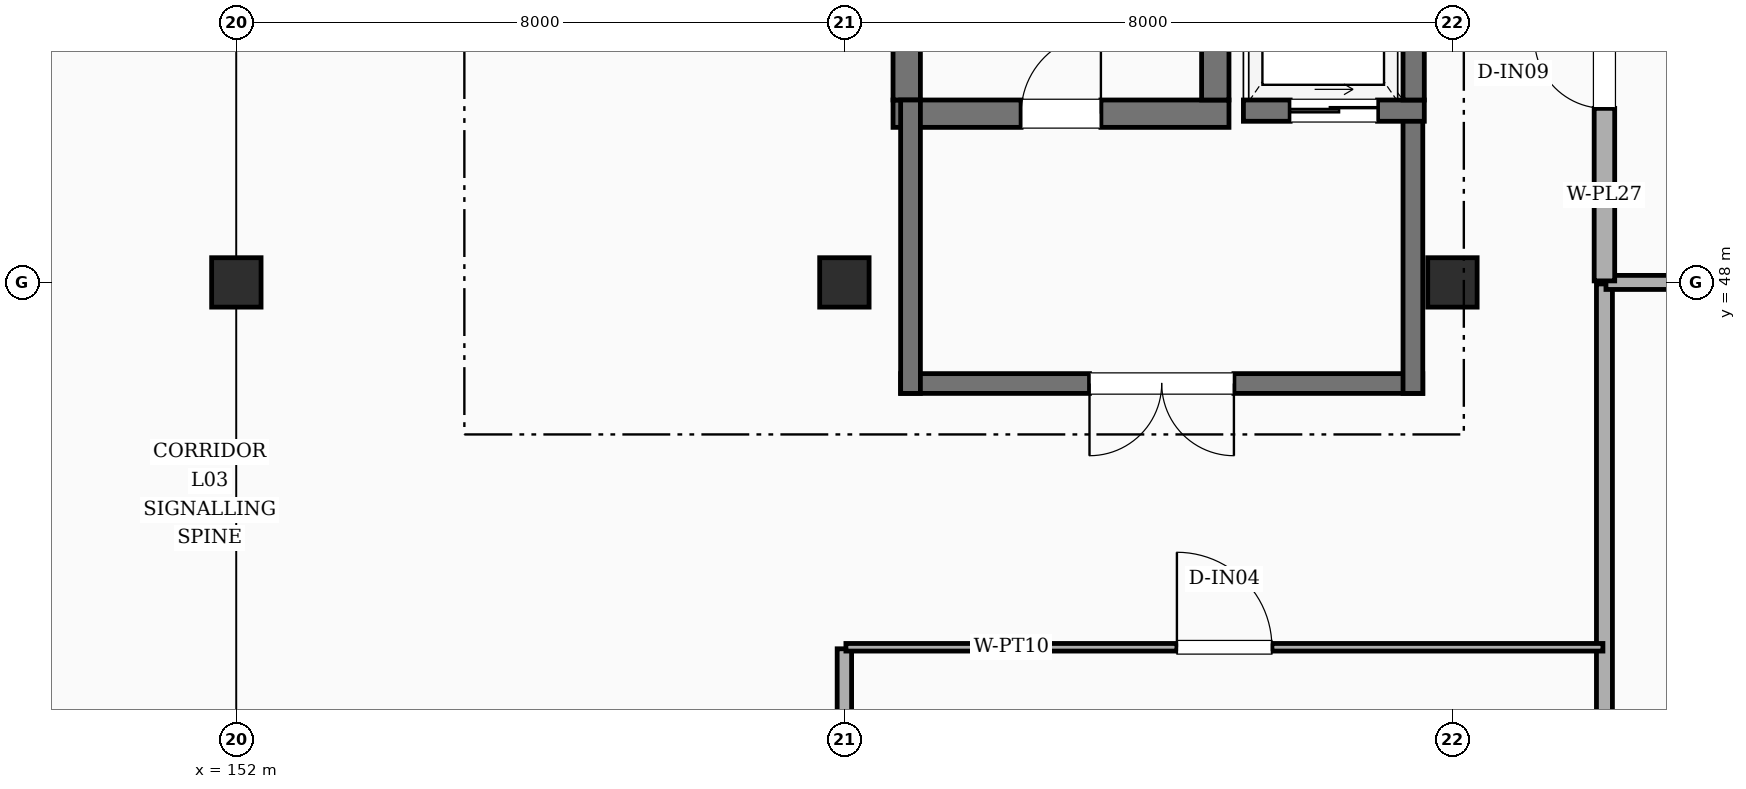
"""IFC4 building model, lengths in metres.
Left out: names, types, materials, properties, quantities, classifications, styles, units other than length and angle.
Written with IfcOpenShell. Run it as: python <this file> out.ifc"""

import sys

from ifc_helpers import new_model, si_unit, direction, frame, frame_2d, origin, origin_2d, place, context, subcontext, project, spatial, rectangle, extrude, element, fill, save


model = new_model("IFC4")
c1 = context("Model", 3, precision=1e-05, world=origin(), true_north=direction((0.0, 1.0)))
c2 = subcontext(c1, "Body", "Model", "MODEL_VIEW")
j1 = project(units=[si_unit("LENGTHUNIT", "METRE"), si_unit("PLANEANGLEUNIT", "RADIAN")], contexts=[c1])
p1 = place(None, origin())
s1 = spatial("IfcSite", under=j1, at=p1, CompositionType="ELEMENT")
p2 = place(p1, origin())
s2 = spatial("IfcBuilding", under=s1, at=p2, CompositionType="ELEMENT")
p3 = place(p2, frame((0.0, 0.0, 15.0)))
s3 = spatial("IfcBuildingStorey", under=s2, at=p3, CompositionType="ELEMENT", Elevation=15.0)
for number, where, z_axis, x_axis in (
    (1, (152.0, 48.0, 0.0), (0.0, 0.0, 1.0), (1.0, 0.0, 0.0)),
    (2, (160.0, 48.0, 0.0), (0.0, 0.0, 1.0), (1.0, 0.0, 0.0)),
    (3, (168.0, 48.0, 0.0), (0.0, 0.0, 1.0), (1.0, 0.0, 0.0)),
):
    element("IfcColumn", number, at=place(p3, frame(where, z_axis=z_axis, x_axis=x_axis)), inside=s3, PredefinedType="COLUMN", context=c2, shape_type="SweptSolid", body=[
        extrude(rectangle(XDim=0.65, YDim=0.65, at=origin_2d()), origin(), (0.0, 0.0, 1.0), 4.2),
    ])
p4 = place(p3, frame((160.64, 50.22, 0.0), z_axis=(0.0, 0.0, 1.0), x_axis=(1.0, 0.0, 0.0)))
e4 = element("IfcWall", 4, at=p4, inside=s3, PredefinedType="SHEAR", context=c2, shape_type="SweptSolid", body=[
    extrude(rectangle(XDim=4.42, YDim=0.36, at=frame_2d((2.21, 0.0))), origin(), (0.0, 0.0, 1.0), 4.2),
])
p5 = place(p4, frame((1.685, 0.0, 0.0)))
e5 = element("IfcOpeningElement", 5, at=p5, cuts=e4, PredefinedType="OPENING", context=c2, shape_type="SweptSolid", body=[
    extrude(rectangle(XDim=1.05, YDim=2.15, at=frame_2d((0.525, 1.075))), frame((0.0, 0.19, 0.0), z_axis=(0.0, -1.0, 0.0), x_axis=(1.0, 0.0, 0.0)), (0.0, 0.0, 1.0), 0.38),
])
for number, where, z_axis, x_axis in (
    (6, (160.82, 50.4, 0.0), (0.0, 0.0, 1.0), (0.0, 1.0, 0.0)),
    (7, (164.88, 50.4, 0.0), (0.0, 0.0, 1.0), (0.0, 1.0, 0.0)),
):
    element("IfcWall", number, at=place(p3, frame(where, z_axis=z_axis, x_axis=x_axis)), inside=s3, PredefinedType="SHEAR", context=c2, shape_type="SweptSolid", body=[
        extrude(rectangle(XDim=8.6, YDim=0.36, at=frame_2d((4.3, 0.0))), origin(), (0.0, 0.0, 1.0), 4.2),
    ])
p6 = place(p3, frame((167.61, 46.67, 0.0), z_axis=(0.0, 0.0, 1.0), x_axis=(-1.0, 0.0, 0.0)))
e8 = element("IfcWall", 8, at=p6, inside=s3, PredefinedType="SHEAR", context=c2, shape_type="SweptSolid", body=[
    extrude(rectangle(XDim=6.87, YDim=0.26, at=frame_2d((3.435, 0.0))), origin(), (0.0, 0.0, 1.0), 4.2),
])
p7 = place(p6, frame((2.485, 0.0, 0.0)))
e9 = element("IfcOpeningElement", 9, at=p7, cuts=e8, PredefinedType="OPENING", context=c2, shape_type="SweptSolid", body=[
    extrude(rectangle(XDim=1.9, YDim=2.25, at=frame_2d((0.95, 1.125))), frame((0.0, 0.14, 0.0), z_axis=(0.0, -1.0, 0.0), x_axis=(1.0, 0.0, 0.0)), (0.0, 0.0, 1.0), 0.28),
])
for number, where, z_axis, x_axis in (
    (10, (160.87, 46.54, 0.0), (0.0, 0.0, 1.0), (0.0, 1.0, 0.0)),
    (11, (167.48, 46.54, 0.0), (0.0, 0.0, 1.0), (0.0, 1.0, 0.0)),
):
    element("IfcWall", number, at=place(p3, frame(where, z_axis=z_axis, x_axis=x_axis)), inside=s3, PredefinedType="SHEAR", context=c2, shape_type="SweptSolid", body=[
        extrude(rectangle(XDim=3.86, YDim=0.26, at=frame_2d((1.93, 0.0))), origin(), (0.0, 0.0, 1.0), 4.2),
    ])
p8 = place(p3, frame((165.25, 50.26, 0.0), z_axis=(0.0, 0.0, 1.0), x_axis=(1.0, 0.0, 0.0)))
e12 = element("IfcWall", 12, at=p8, inside=s3, PredefinedType="SHEAR", context=c2, shape_type="SweptSolid", body=[
    extrude(rectangle(XDim=2.38, YDim=0.28, at=frame_2d((1.19, 0.0))), origin(), (0.0, 0.0, 1.0), 4.2),
])
p9 = place(p8, frame((0.615, 0.0, 0.0)))
e13 = element("IfcOpeningElement", 13, at=p9, cuts=e12, PredefinedType="OPENING", context=c2, shape_type="SweptSolid", body=[
    extrude(rectangle(XDim=1.15, YDim=2.2, at=frame_2d((0.575, 1.1))), frame((0.0, 0.15, 0.0), z_axis=(0.0, -1.0, 0.0), x_axis=(1.0, 0.0, 0.0)), (0.0, 0.0, 1.0), 0.3),
])
p10 = place(p3, frame((167.49, 50.4, 0.0), z_axis=(0.0, 0.0, 1.0), x_axis=(0.0, 1.0, 0.0)))
e14 = element("IfcWall", 14, at=p10, inside=s3, PredefinedType="SHEAR", context=c2, shape_type="SweptSolid", body=[
    extrude(rectangle(XDim=2.8, YDim=0.28, at=frame_2d((1.4, 0.0))), origin(), (0.0, 0.0, 1.0), 4.2),
])
p11 = place(p3, frame((160.0, 24.02, 0.0), z_axis=(0.0, 0.0, 1.0), x_axis=(0.0, 1.0, 0.0)))
e15 = element("IfcWall", 15, at=p11, inside=s3, PredefinedType="SOLIDWALL", context=c2, shape_type="SweptSolid", body=[
    extrude(rectangle(XDim=19.16, YDim=0.19, at=frame_2d((9.58, 0.0))), origin(), (0.0, 0.0, 1.0), 3.31),
])
p12 = place(p3, frame((170.0, 24.02, 0.0), z_axis=(0.0, 0.0, 1.0), x_axis=(0.0, 1.0, 0.0)))
e16 = element("IfcWall", 16, at=p12, inside=s3, PredefinedType="SOLIDWALL", context=c2, shape_type="SweptSolid", body=[
    extrude(rectangle(XDim=23.96, YDim=0.21, at=frame_2d((11.98, 0.0))), origin(), (0.0, 0.0, 1.0), 3.31),
])
p13 = place(p12, frame((11.38, 0.0, 0.0)))
e17 = element("IfcOpeningElement", 17, at=p13, cuts=e16, PredefinedType="OPENING", context=c2, shape_type="SweptSolid", body=[
    extrude(rectangle(XDim=1.2, YDim=2.15, at=frame_2d((0.6, 1.075))), frame((0.0, 0.115, 0.0), z_axis=(0.0, -1.0, 0.0), x_axis=(1.0, 0.0, 0.0)), (0.0, 0.0, 1.0), 0.23),
])
p14 = place(p3, frame((170.02, 48.0, 0.0), z_axis=(0.0, 0.0, 1.0), x_axis=(1.0, 0.0, 0.0)))
e18 = element("IfcWall", 18, at=p14, inside=s3, PredefinedType="PLUMBINGWALL", context=c2, shape_type="SweptSolid", body=[
    extrude(rectangle(XDim=5.86, YDim=0.185, at=frame_2d((2.93, 0.0))), origin(), (0.0, 0.0, 1.0), 3.31),
])
p15 = place(p3, frame((170.0, 48.02, 0.0), z_axis=(0.0, 0.0, 1.0), x_axis=(0.0, 1.0, 0.0)))
e19 = element("IfcWall", 19, at=p15, inside=s3, PredefinedType="PLUMBINGWALL", context=c2, shape_type="SweptSolid", body=[
    extrude(rectangle(XDim=5.46, YDim=0.27, at=frame_2d((2.73, 0.0))), origin(), (0.0, 0.0, 1.0), 3.31),
])
p16 = place(p15, frame((2.27, 0.0, 0.0)))
e20 = element("IfcOpeningElement", 20, at=p16, cuts=e19, PredefinedType="OPENING", context=c2, shape_type="SweptSolid", body=[
    extrude(rectangle(XDim=0.92, YDim=2.1, at=frame_2d((0.46, 1.05))), frame((0.0, 0.145, 0.0), z_axis=(0.0, -1.0, 0.0), x_axis=(1.0, 0.0, 0.0)), (0.0, 0.0, 1.0), 0.29),
])
p17 = place(p3, frame((160.02, 43.2, 0.0), z_axis=(0.0, 0.0, 1.0), x_axis=(1.0, 0.0, 0.0)))
e21 = element("IfcWall", 21, at=p17, inside=s3, PredefinedType="PARTITIONING", context=c2, shape_type="SweptSolid", body=[
    extrude(rectangle(XDim=9.96, YDim=0.1, at=frame_2d((4.98, 0.0))), origin(), (0.0, 0.0, 1.0), 3.31),
])
p18 = place(p17, frame((4.355, 0.0, 0.0)))
e22 = element("IfcOpeningElement", 22, at=p18, cuts=e21, PredefinedType="OPENING", context=c2, shape_type="SweptSolid", body=[
    extrude(rectangle(XDim=1.25, YDim=2.15, at=frame_2d((0.625, 1.075))), frame((0.0, 0.06, 0.0), z_axis=(0.0, -1.0, 0.0), x_axis=(1.0, 0.0, 0.0)), (0.0, 0.0, 1.0), 0.12),
])
p19 = place(p5, origin())
e23 = element("IfcDoor", 23, at=p19, inside=s3, OperationType="SINGLE_SWING_RIGHT", PredefinedType="DOOR", context=c2, shape_type="SweptSolid", body=[
    extrude(rectangle(XDim=1.05, YDim=2.15, at=frame_2d((0.525, 1.075))), frame((0.0, 0.025, 0.0), z_axis=(0.0, -1.0, 0.0), x_axis=(1.0, 0.0, 0.0)), (0.0, 0.0, 1.0), 0.05),
])
fill(e5, e23)
p20 = place(p7, origin())
e24 = element("IfcDoor", 24, at=p20, inside=s3, OperationType="DOUBLE_DOOR_SINGLE_SWING", PredefinedType="DOOR", context=c2, shape_type="SweptSolid", body=[
    extrude(rectangle(XDim=1.9, YDim=2.25, at=frame_2d((0.95, 1.125))), frame((0.0, 0.025, 0.0), z_axis=(0.0, -1.0, 0.0), x_axis=(1.0, 0.0, 0.0)), (0.0, 0.0, 1.0), 0.05),
])
fill(e9, e24)
p21 = place(p9, origin())
e25 = element("IfcDoor", 25, at=p21, inside=s3, OperationType="SLIDING_TO_LEFT", PredefinedType="DOOR", context=c2, shape_type="SweptSolid", body=[
    extrude(rectangle(XDim=1.15, YDim=2.2, at=frame_2d((0.575, 1.1))), frame((0.0, 0.025, 0.0), z_axis=(0.0, -1.0, 0.0), x_axis=(1.0, 0.0, 0.0)), (0.0, 0.0, 1.0), 0.05),
])
fill(e13, e25)
p22 = place(p16, origin())
e26 = element("IfcDoor", 26, at=p22, inside=s3, OperationType="SINGLE_SWING_RIGHT", PredefinedType="DOOR", context=c2, shape_type="SweptSolid", body=[
    extrude(rectangle(XDim=0.92, YDim=2.1, at=frame_2d((0.46, 1.05))), frame((0.0, 0.025, 0.0), z_axis=(0.0, -1.0, 0.0), x_axis=(1.0, 0.0, 0.0)), (0.0, 0.0, 1.0), 0.05),
])
fill(e20, e26)
p23 = place(p18, origin())
e27 = element("IfcDoor", 27, at=p23, inside=s3, OperationType="SINGLE_SWING_LEFT", PredefinedType="DOOR", context=c2, shape_type="SweptSolid", body=[
    extrude(rectangle(XDim=1.25, YDim=2.15, at=frame_2d((0.625, 1.075))), frame((0.0, 0.025, 0.0), z_axis=(0.0, -1.0, 0.0), x_axis=(1.0, 0.0, 0.0)), (0.0, 0.0, 1.0), 0.05),
])
fill(e22, e27)
save(model, sys.argv[1])
